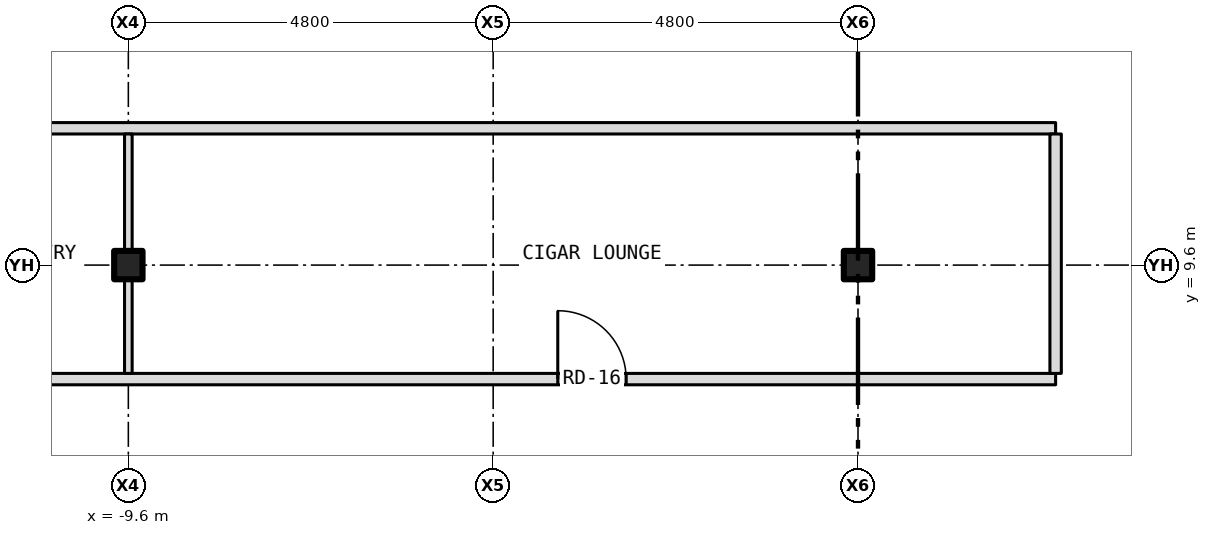
"""IFC4 building model, lengths in metres.
Left out: names, types, materials, properties, quantities, classifications, styles, units other than length and angle.
Written with IfcOpenShell. Run it as: python <this file> out.ifc"""

import sys

from ifc_helpers import new_model, si_unit, direction, frame, frame_2d, origin, origin_2d, place, context, subcontext, project, spatial, rectangle, i_section, extrude, element, fill, save


model = new_model("IFC4")
c1 = context("Model", 3, precision=1e-05, world=origin(), true_north=direction((0.0, 1.0)))
c2 = subcontext(c1, "Body", "Model", "MODEL_VIEW")
j1 = project(units=[si_unit("LENGTHUNIT", "METRE"), si_unit("PLANEANGLEUNIT", "RADIAN")], contexts=[c1])
p1 = place(None, origin())
s1 = spatial("IfcSite", under=j1, at=p1, CompositionType="ELEMENT")
p2 = place(p1, origin())
s2 = spatial("IfcBuilding", under=s1, at=p2, CompositionType="ELEMENT")
p3 = place(p2, frame((0.0, 0.0, 162.0)))
s3 = spatial("IfcBuildingStorey", under=s2, at=p3, CompositionType="ELEMENT", Elevation=162.0)
for number, where, z_axis, x_axis in (
    (1, (-9.6, 9.6, -0.15), (0.0, 0.0, 1.0), (1.0, 0.0, 0.0)),
    (2, (0.0, 9.6, -0.15), (0.0, 0.0, 1.0), (1.0, 0.0, 0.0)),
):
    element("IfcColumn", number, at=place(p3, frame(where, z_axis=z_axis, x_axis=x_axis)), inside=s3, PredefinedType="COLUMN", context=c2, shape_type="SweptSolid", body=[
        extrude(i_section(OverallWidth=0.373, OverallDepth=0.373, WebThickness=0.016, FlangeThickness=0.026, at=origin_2d()), origin(), (0.0, 0.0, 1.0), 3.5),
    ])
p4 = place(p3, frame((-12.8, 8.1, 0.0), z_axis=(0.0, 0.0, 1.0), x_axis=(1.0, 0.0, 0.0)))
e3 = element("IfcWall", 3, at=p4, inside=s3, PredefinedType="PARTITIONING", context=c2, shape_type="SweptSolid", body=[
    extrude(rectangle(XDim=15.4, YDim=0.15, at=frame_2d((7.7, 0.0))), origin(), (0.0, 0.0, 1.0), 3.35),
])
p5 = place(p4, frame((8.85, 0.0, 0.0)))
e4 = element("IfcOpeningElement", 4, at=p5, cuts=e3, PredefinedType="OPENING", context=c2, shape_type="SweptSolid", body=[
    extrude(rectangle(XDim=0.9, YDim=2.1, at=frame_2d((0.45, 1.05))), frame((0.0, 0.087, 0.0), z_axis=(0.0, -1.0, 0.0), x_axis=(1.0, 0.0, 0.0)), (0.0, 0.0, 1.0), 0.174),
])
p6 = place(p3, frame((-12.8, 11.4, 0.0), z_axis=(0.0, 0.0, 1.0), x_axis=(1.0, 0.0, 0.0)))
e5 = element("IfcWall", 5, at=p6, inside=s3, PredefinedType="PARTITIONING", context=c2, shape_type="SweptSolid", body=[
    extrude(rectangle(XDim=15.4, YDim=0.15, at=frame_2d((7.7, 0.0))), origin(), (0.0, 0.0, 1.0), 3.35),
])
p7 = place(p6, frame((1.15, 0.0, 0.0)))
e6 = element("IfcOpeningElement", 6, at=p7, cuts=e5, PredefinedType="OPENING", context=c2, shape_type="SweptSolid", body=[
    extrude(rectangle(XDim=0.9, YDim=2.1, at=frame_2d((0.45, 1.05))), frame((0.0, 0.087, 0.0), z_axis=(0.0, -1.0, 0.0), x_axis=(1.0, 0.0, 0.0)), (0.0, 0.0, 1.0), 0.174),
])
p8 = place(p3, frame((-9.6, 8.175, 0.0), z_axis=(0.0, 0.0, 1.0), x_axis=(0.0, 1.0, 0.0)))
e7 = element("IfcWall", 7, at=p8, inside=s3, PredefinedType="PARTITIONING", context=c2, shape_type="SweptSolid", body=[
    extrude(rectangle(XDim=1.238, YDim=0.1, at=frame_2d((0.619, 0.0))), origin(), (0.0, 0.0, 1.0), 2.728),
])
p9 = place(p3, frame((-9.6, 9.413, 0.0), z_axis=(0.0, 0.0, 1.0), x_axis=(0.0, 1.0, 0.0)))
e8 = element("IfcWall", 8, at=p9, inside=s3, PredefinedType="PARTITIONING", context=c2, shape_type="SweptSolid", body=[
    extrude(rectangle(XDim=0.374, YDim=0.1, at=frame_2d((0.187, 0.0))), origin(), (0.0, 0.0, 1.0), 3.35),
])
p10 = place(p3, frame((-9.6, 9.787, 0.0), z_axis=(0.0, 0.0, 1.0), x_axis=(0.0, 1.0, 0.0)))
e9 = element("IfcWall", 9, at=p10, inside=s3, PredefinedType="PARTITIONING", context=c2, shape_type="SweptSolid", body=[
    extrude(rectangle(XDim=1.538, YDim=0.1, at=frame_2d((0.769, 0.0))), origin(), (0.0, 0.0, 1.0), 2.728),
])
p11 = place(p3, frame((2.6, 8.175, 0.0), z_axis=(0.0, 0.0, 1.0), x_axis=(0.0, 1.0, 0.0)))
e10 = element("IfcWall", 10, at=p11, inside=s3, PredefinedType="PARTITIONING", context=c2, shape_type="SweptSolid", body=[
    extrude(rectangle(XDim=3.15, YDim=0.15, at=frame_2d((1.575, 0.0))), origin(), (0.0, 0.0, 1.0), 3.35),
])
p12 = place(p5, origin())
e11 = element("IfcDoor", 11, at=p12, inside=s3, OperationType="SINGLE_SWING_LEFT", PredefinedType="DOOR", context=c2, shape_type="SweptSolid", body=[
    extrude(rectangle(XDim=0.9, YDim=2.1, at=frame_2d((0.45, 1.05))), frame((0.0, 0.025, 0.0), z_axis=(0.0, -1.0, 0.0), x_axis=(1.0, 0.0, 0.0)), (0.0, 0.0, 1.0), 0.05),
])
fill(e4, e11)
save(model, sys.argv[1])
